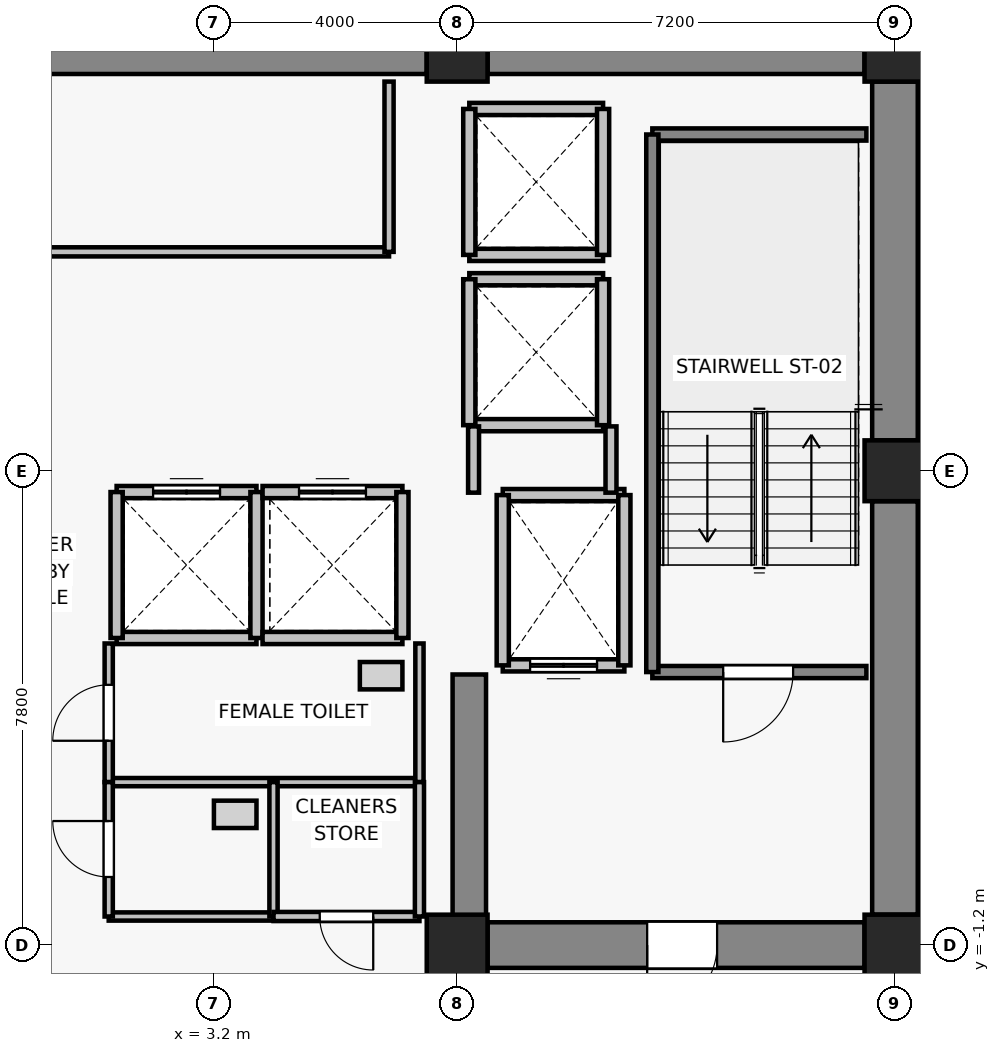
"""IFC4 building model, lengths in metres.
Left out: names, types, materials, properties, quantities, classifications, styles, units other than length and angle.
Written with IfcOpenShell. Run it as: python <this file> out.ifc"""

import sys

from ifc_helpers import new_model, si_unit, direction, frame, frame_2d, origin, origin_2d, place, context, subcontext, project, spatial, rectangle, extrude, source, transform, mapped, element, fill, save


model = new_model("IFC4")
c1 = context("Model", 3, precision=1e-05, world=origin(), true_north=direction((0.0, 1.0)))
c2 = subcontext(c1, "Body", "Model", "MODEL_VIEW")
j1 = project(units=[si_unit("LENGTHUNIT", "METRE"), si_unit("PLANEANGLEUNIT", "RADIAN")], contexts=[c1])
p1 = place(None, origin())
s1 = spatial("IfcSite", under=j1, at=p1, CompositionType="ELEMENT")
p2 = place(p1, origin())
s2 = spatial("IfcBuilding", under=s1, at=p2, CompositionType="ELEMENT")
p3 = place(p2, frame((0.0, 0.0, 182.5)))
s3 = spatial("IfcBuildingStorey", under=s2, at=p3, CompositionType="ELEMENT", Elevation=182.5)
for number, where, z_axis, x_axis in (
    (1, (7.2, -1.2, 0.0), (0.0, 0.0, 1.0), (1.0, 0.0, 0.0)),
    (2, (14.4, -1.2, 0.0), (0.0, 0.0, 1.0), (1.0, 0.0, 0.0)),
    (3, (14.4, 6.6, 0.0), (0.0, 0.0, 1.0), (1.0, 0.0, 0.0)),
    (4, (7.2, 13.5, 0.0), (0.0, 0.0, 1.0), (1.0, 0.0, 0.0)),
    (5, (14.4, 13.5, 0.0), (0.0, 0.0, 1.0), (1.0, 0.0, 0.0)),
):
    element("IfcColumn", number, at=place(p3, frame(where, z_axis=z_axis, x_axis=x_axis)), inside=s3, PredefinedType="COLUMN", context=c2, shape_type="SweptSolid", body=[
        extrude(rectangle(XDim=1.0, YDim=1.0, at=origin_2d()), origin(), (0.0, 0.0, 1.0), 3.3),
    ])
p4 = place(p3, frame((-6.7, 13.5, 0.0), z_axis=(0.0, 0.0, 1.0), x_axis=(1.0, 0.0, 0.0)))
e6 = element("IfcWall", 6, at=p4, inside=s3, PredefinedType="SHEAR", context=c2, shape_type="SweptSolid", body=[
    extrude(rectangle(XDim=13.4, YDim=0.75, at=frame_2d((6.7, 0.0))), origin(), (0.0, 0.0, 1.0), 3.075),
])
p5 = place(p3, frame((7.7, 13.5, 0.0), z_axis=(0.0, 0.0, 1.0), x_axis=(1.0, 0.0, 0.0)))
e7 = element("IfcWall", 7, at=p5, inside=s3, PredefinedType="SHEAR", context=c2, shape_type="SweptSolid", body=[
    extrude(rectangle(XDim=6.2, YDim=0.75, at=frame_2d((3.1, 0.0))), origin(), (0.0, 0.0, 1.0), 3.075),
])
p6 = place(p3, frame((14.4, -0.7, 0.0), z_axis=(0.0, 0.0, 1.0), x_axis=(0.0, 1.0, 0.0)))
e8 = element("IfcWall", 8, at=p6, inside=s3, PredefinedType="SHEAR", context=c2, shape_type="SweptSolid", body=[
    extrude(rectangle(XDim=6.8, YDim=0.75, at=frame_2d((3.4, 0.0))), origin(), (0.0, 0.0, 1.0), 3.075),
])
p7 = place(p3, frame((14.4, 7.1, 0.0), z_axis=(0.0, 0.0, 1.0), x_axis=(0.0, 1.0, 0.0)))
e9 = element("IfcWall", 9, at=p7, inside=s3, PredefinedType="SHEAR", context=c2, shape_type="SweptSolid", body=[
    extrude(rectangle(XDim=5.9, YDim=0.75, at=frame_2d((2.95, 0.0))), origin(), (0.0, 0.0, 1.0), 3.075),
])
p8 = place(p3, frame((13.9, -1.2, 0.0), z_axis=(0.0, 0.0, 1.0), x_axis=(-1.0, 0.0, 0.0)))
e10 = element("IfcWall", 10, at=p8, inside=s3, PredefinedType="SHEAR", context=c2, shape_type="SweptSolid", body=[
    extrude(rectangle(XDim=6.2, YDim=0.75, at=frame_2d((3.1, 0.0))), origin(), (0.0, 0.0, 1.0), 3.075),
])
p9 = place(p8, frame((2.425, 0.0, 0.0)))
e11 = element("IfcOpeningElement", 11, at=p9, cuts=e10, PredefinedType="OPENING", context=c2, shape_type="SweptSolid", body=[
    extrude(rectangle(XDim=1.15, YDim=2.15, at=frame_2d((0.575, 1.075))), frame((0.0, 0.385, 0.0), z_axis=(0.0, -1.0, 0.0), x_axis=(1.0, 0.0, 0.0)), (0.0, 0.0, 1.0), 0.77),
])
p10 = place(p3, frame((7.4, -0.825, 0.0), z_axis=(0.0, 0.0, 1.0), x_axis=(0.0, 1.0, 0.0)))
e12 = element("IfcWall", 12, at=p10, inside=s3, PredefinedType="SHEAR", context=c2, shape_type="SweptSolid", body=[
    extrude(rectangle(XDim=4.075, YDim=0.55, at=frame_2d((2.038, 0.0))), origin(), (0.0, 0.0, 1.0), 3.075),
])
p11 = place(p3, frame((9.95, 3.4, 0.0), z_axis=(0.0, 0.0, 1.0), x_axis=(-1.0, 0.0, 0.0)))
e13 = element("IfcWall", 13, at=p11, inside=s3, PredefinedType="SOLIDWALL", context=c2, shape_type="SweptSolid", body=[
    extrude(rectangle(XDim=2.0, YDim=0.2, at=frame_2d((1.0, 0.0))), origin(), (0.0, 0.0, 1.0), 3.075),
])
p12 = place(p11, frame((0.45, 0.0, 0.0)))
e14 = element("IfcOpeningElement", 14, at=p12, cuts=e13, PredefinedType="OPENING", context=c2, shape_type="SweptSolid", body=[
    extrude(rectangle(XDim=1.1, YDim=2.2, at=frame_2d((0.55, 1.1))), frame((0.0, 0.11, 0.0), z_axis=(0.0, -1.0, 0.0), x_axis=(1.0, 0.0, 0.0)), (0.0, 0.0, 1.0), 0.22),
])
p13 = place(p3, frame((7.95, 6.2, 0.0), z_axis=(0.0, 0.0, 1.0), x_axis=(1.0, 0.0, 0.0)))
e15 = element("IfcWall", 15, at=p13, inside=s3, PredefinedType="SOLIDWALL", context=c2, shape_type="SweptSolid", body=[
    extrude(rectangle(XDim=2.0, YDim=0.2, at=frame_2d((1.0, 0.0))), origin(), (0.0, 0.0, 1.0), 3.075),
])
for number, where, z_axis, x_axis in (
    (16, (7.95, 3.4, 0.0), (0.0, 0.0, 1.0), (0.0, 1.0, 0.0)),
    (17, (9.95, 6.2, 0.0), (0.0, 0.0, 1.0), (0.0, -1.0, 0.0)),
):
    element("IfcWall", number, at=place(p3, frame(where, z_axis=z_axis, x_axis=x_axis)), inside=s3, PredefinedType="SOLIDWALL", context=c2, shape_type="SweptSolid", body=[
        extrude(rectangle(XDim=2.8, YDim=0.2, at=frame_2d((1.4, 0.0))), origin(), (0.0, 0.0, 1.0), 3.075),
    ])
p14 = place(p3, frame((3.9, 3.85, 0.0), z_axis=(0.0, 0.0, 1.0), x_axis=(-1.0, 0.0, 0.0)))
e18 = element("IfcWall", 18, at=p14, inside=s3, PredefinedType="SOLIDWALL", context=c2, shape_type="SweptSolid", body=[
    extrude(rectangle(XDim=2.3, YDim=0.2, at=frame_2d((1.15, 0.0))), origin(), (0.0, 0.0, 1.0), 3.075),
])
p15 = place(p3, frame((1.6, 6.25, 0.0), z_axis=(0.0, 0.0, 1.0), x_axis=(1.0, 0.0, 0.0)))
e19 = element("IfcWall", 19, at=p15, inside=s3, PredefinedType="SOLIDWALL", context=c2, shape_type="SweptSolid", body=[
    extrude(rectangle(XDim=2.3, YDim=0.2, at=frame_2d((1.15, 0.0))), origin(), (0.0, 0.0, 1.0), 3.075),
])
p16 = place(p15, frame((0.6, 0.0, 0.0)))
e20 = element("IfcOpeningElement", 20, at=p16, cuts=e19, PredefinedType="OPENING", context=c2, shape_type="SweptSolid", body=[
    extrude(rectangle(XDim=1.1, YDim=2.2, at=frame_2d((0.55, 1.1))), frame((0.0, 0.11, 0.0), z_axis=(0.0, -1.0, 0.0), x_axis=(1.0, 0.0, 0.0)), (0.0, 0.0, 1.0), 0.22),
])
for number, where, z_axis, x_axis in (
    (21, (1.6, 3.85, 0.0), (0.0, 0.0, 1.0), (0.0, 1.0, 0.0)),
    (22, (3.9, 6.25, 0.0), (0.0, 0.0, 1.0), (0.0, -1.0, 0.0)),
):
    element("IfcWall", number, at=place(p3, frame(where, z_axis=z_axis, x_axis=x_axis)), inside=s3, PredefinedType="SOLIDWALL", context=c2, shape_type="SweptSolid", body=[
        extrude(rectangle(XDim=2.4, YDim=0.2, at=frame_2d((1.2, 0.0))), origin(), (0.0, 0.0, 1.0), 3.075),
    ])
p17 = place(p3, frame((6.3, 3.85, 0.0), z_axis=(0.0, 0.0, 1.0), x_axis=(-1.0, 0.0, 0.0)))
e23 = element("IfcWall", 23, at=p17, inside=s3, PredefinedType="SOLIDWALL", context=c2, shape_type="SweptSolid", body=[
    extrude(rectangle(XDim=2.3, YDim=0.2, at=frame_2d((1.15, 0.0))), origin(), (0.0, 0.0, 1.0), 3.075),
])
p18 = place(p3, frame((4.0, 6.25, 0.0), z_axis=(0.0, 0.0, 1.0), x_axis=(1.0, 0.0, 0.0)))
e24 = element("IfcWall", 24, at=p18, inside=s3, PredefinedType="SOLIDWALL", context=c2, shape_type="SweptSolid", body=[
    extrude(rectangle(XDim=2.3, YDim=0.2, at=frame_2d((1.15, 0.0))), origin(), (0.0, 0.0, 1.0), 3.075),
])
p19 = place(p18, frame((0.6, 0.0, 0.0)))
e25 = element("IfcOpeningElement", 25, at=p19, cuts=e24, PredefinedType="OPENING", context=c2, shape_type="SweptSolid", body=[
    extrude(rectangle(XDim=1.1, YDim=2.2, at=frame_2d((0.55, 1.1))), frame((0.0, 0.11, 0.0), z_axis=(0.0, -1.0, 0.0), x_axis=(1.0, 0.0, 0.0)), (0.0, 0.0, 1.0), 0.22),
])
p20 = place(p3, frame((6.3, 6.25, 0.0), z_axis=(0.0, 0.0, 1.0), x_axis=(0.0, -1.0, 0.0)))
e26 = element("IfcWall", 26, at=p20, inside=s3, PredefinedType="SOLIDWALL", context=c2, shape_type="SweptSolid", body=[
    extrude(rectangle(XDim=2.4, YDim=0.2, at=frame_2d((1.2, 0.0))), origin(), (0.0, 0.0, 1.0), 3.075),
])
for number, where, z_axis, x_axis in (
    (27, (9.6, 7.35, 0.0), (0.0, 0.0, 1.0), (-1.0, 0.0, 0.0)),
    (28, (7.4, 9.75, 0.0), (0.0, 0.0, 1.0), (1.0, 0.0, 0.0)),
):
    element("IfcWall", number, at=place(p3, frame(where, z_axis=z_axis, x_axis=x_axis)), inside=s3, PredefinedType="SOLIDWALL", context=c2, shape_type="SweptSolid", body=[
        extrude(rectangle(XDim=2.2, YDim=0.2, at=frame_2d((1.1, 0.0))), origin(), (0.0, 0.0, 1.0), 2.565),
    ])
p21 = place(p3, frame((7.4, 7.35, 0.0), z_axis=(0.0, 0.0, 1.0), x_axis=(0.0, 1.0, 0.0)))
e29 = element("IfcWall", 29, at=p21, inside=s3, PredefinedType="SOLIDWALL", context=c2, shape_type="SweptSolid", body=[
    extrude(rectangle(XDim=2.4, YDim=0.2, at=frame_2d((1.2, 0.0))), origin(), (0.0, 0.0, 1.0), 2.565),
])
p22 = place(p3, frame((9.6, 9.75, 0.0), z_axis=(0.0, 0.0, 1.0), x_axis=(0.0, -1.0, 0.0)))
e30 = element("IfcWall", 30, at=p22, inside=s3, PredefinedType="SOLIDWALL", context=c2, shape_type="SweptSolid", body=[
    extrude(rectangle(XDim=2.4, YDim=0.2, at=frame_2d((1.2, 0.0))), origin(), (0.0, 0.0, 1.0), 3.075),
])
for number, where, z_axis, x_axis in (
    (31, (9.6, 10.15, 0.0), (0.0, 0.0, 1.0), (-1.0, 0.0, 0.0)),
    (32, (7.4, 12.55, 0.0), (0.0, 0.0, 1.0), (1.0, 0.0, 0.0)),
):
    element("IfcWall", number, at=place(p3, frame(where, z_axis=z_axis, x_axis=x_axis)), inside=s3, PredefinedType="SOLIDWALL", context=c2, shape_type="SweptSolid", body=[
        extrude(rectangle(XDim=2.2, YDim=0.2, at=frame_2d((1.1, 0.0))), origin(), (0.0, 0.0, 1.0), 2.565),
    ])
p23 = place(p3, frame((7.4, 10.15, 0.0), z_axis=(0.0, 0.0, 1.0), x_axis=(0.0, 1.0, 0.0)))
e33 = element("IfcWall", 33, at=p23, inside=s3, PredefinedType="SOLIDWALL", context=c2, shape_type="SweptSolid", body=[
    extrude(rectangle(XDim=2.4, YDim=0.2, at=frame_2d((1.2, 0.0))), origin(), (0.0, 0.0, 1.0), 2.565),
])
p24 = place(p3, frame((9.6, 12.55, 0.0), z_axis=(0.0, 0.0, 1.0), x_axis=(0.0, -1.0, 0.0)))
e34 = element("IfcWall", 34, at=p24, inside=s3, PredefinedType="SOLIDWALL", context=c2, shape_type="SweptSolid", body=[
    extrude(rectangle(XDim=2.4, YDim=0.2, at=frame_2d((1.2, 0.0))), origin(), (0.0, 0.0, 1.0), 3.075),
])
p25 = place(p3, frame((13.93, 3.29, 0.0), z_axis=(0.0, 0.0, 1.0), x_axis=(-1.0, 0.0, 0.0)))
e35 = element("IfcWall", 35, at=p25, inside=s3, PredefinedType="SOLIDWALL", context=c2, shape_type="SweptSolid", body=[
    extrude(rectangle(XDim=3.52, YDim=0.2, at=frame_2d((1.76, 0.0))), origin(), (0.0, 0.0, 1.0), 3.075),
])
p26 = place(p25, frame((1.205, 0.0, 0.0)))
e36 = element("IfcOpeningElement", 36, at=p26, cuts=e35, PredefinedType="OPENING", context=c2, shape_type="SweptSolid", body=[
    extrude(rectangle(XDim=1.15, YDim=2.15, at=frame_2d((0.575, 1.075))), frame((0.0, 0.11, 0.0), z_axis=(0.0, -1.0, 0.0), x_axis=(1.0, 0.0, 0.0)), (0.0, 0.0, 1.0), 0.22),
])
p27 = place(p3, frame((10.41, 12.13, 0.0), z_axis=(0.0, 0.0, 1.0), x_axis=(1.0, 0.0, 0.0)))
e37 = element("IfcWall", 37, at=p27, inside=s3, PredefinedType="SOLIDWALL", context=c2, shape_type="SweptSolid", body=[
    extrude(rectangle(XDim=3.52, YDim=0.2, at=frame_2d((1.76, 0.0))), origin(), (0.0, 0.0, 1.0), 3.075),
])
p28 = place(p3, frame((10.41, 3.29, 0.0), z_axis=(0.0, 0.0, 1.0), x_axis=(0.0, 1.0, 0.0)))
e38 = element("IfcWall", 38, at=p28, inside=s3, PredefinedType="SOLIDWALL", context=c2, shape_type="SweptSolid", body=[
    extrude(rectangle(XDim=8.84, YDim=0.2, at=frame_2d((4.42, 0.0))), origin(), (0.0, 0.0, 1.0), 3.075),
])
p29 = place(p3, frame((7.47, 6.24, 0.0), z_axis=(0.0, 0.0, 1.0), x_axis=(0.0, 1.0, 0.0)))
e39 = element("IfcWall", 39, at=p29, inside=s3, PredefinedType="PARTITIONING", context=c2, shape_type="SweptSolid", body=[
    extrude(rectangle(XDim=1.09, YDim=0.18, at=frame_2d((0.545, 0.0))), origin(), (0.0, 0.0, 1.0), 2.565),
])
p30 = place(p3, frame((9.73, 7.33, 0.0), z_axis=(0.0, 0.0, 1.0), x_axis=(0.0, -1.0, 0.0)))
e40 = element("IfcWall", 40, at=p30, inside=s3, PredefinedType="PARTITIONING", context=c2, shape_type="SweptSolid", body=[
    extrude(rectangle(XDim=1.09, YDim=0.18, at=frame_2d((0.545, 0.0))), origin(), (0.0, 0.0, 1.0), 3.075),
])
p31 = place(p3, frame((6.08, 10.2, 0.0), z_axis=(0.0, 0.0, 1.0), x_axis=(-1.0, 0.0, 0.0)))
e41 = element("IfcWall", 41, at=p31, inside=s3, PredefinedType="PARTITIONING", context=c2, shape_type="SweptSolid", body=[
    extrude(rectangle(XDim=12.16, YDim=0.15, at=frame_2d((6.08, 0.0))), origin(), (0.0, 0.0, 1.0), 3.075),
])
p32 = place(p31, frame((7.005, 0.0, 0.0)))
e42 = element("IfcOpeningElement", 42, at=p32, cuts=e41, PredefinedType="OPENING", context=c2, shape_type="SweptSolid", body=[
    extrude(rectangle(XDim=1.15, YDim=2.15, at=frame_2d((0.575, 1.075))), frame((0.0, 0.085, 0.0), z_axis=(0.0, -1.0, 0.0), x_axis=(1.0, 0.0, 0.0)), (0.0, 0.0, 1.0), 0.17),
])
p33 = place(p3, frame((6.08, 13.0, 0.0), z_axis=(0.0, 0.0, 1.0), x_axis=(0.0, -1.0, 0.0)))
e43 = element("IfcWall", 43, at=p33, inside=s3, PredefinedType="PARTITIONING", context=c2, shape_type="SweptSolid", body=[
    extrude(rectangle(XDim=2.8, YDim=0.15, at=frame_2d((1.4, 0.0))), origin(), (0.0, 0.0, 1.0), 3.075),
])
p34 = place(p3, frame((6.58, 1.48, 0.0), z_axis=(0.0, 0.0, 1.0), x_axis=(-1.0, 0.0, 0.0)))
e44 = element("IfcWall", 44, at=p34, inside=s3, PredefinedType="PARTITIONING", context=c2, shape_type="SweptSolid", body=[
    extrude(rectangle(XDim=5.11, YDim=0.135, at=frame_2d((2.555, 0.0))), origin(), (0.0, 0.0, 1.0), 3.075),
])
p35 = place(p3, frame((1.47, 1.48, 0.0), z_axis=(0.0, 0.0, 1.0), x_axis=(0.0, 1.0, 0.0)))
e45 = element("IfcWall", 45, at=p35, inside=s3, PredefinedType="PARTITIONING", context=c2, shape_type="SweptSolid", body=[
    extrude(rectangle(XDim=2.28, YDim=0.135, at=frame_2d((1.14, 0.0))), origin(), (0.0, 0.0, 1.0), 3.075),
])
p36 = place(p35, frame((0.68, 0.0, 0.0)))
e46 = element("IfcOpeningElement", 46, at=p36, cuts=e45, PredefinedType="OPENING", context=c2, shape_type="SweptSolid", body=[
    extrude(rectangle(XDim=0.92, YDim=2.1, at=frame_2d((0.46, 1.05))), frame((0.0, 0.077, 0.0), z_axis=(0.0, -1.0, 0.0), x_axis=(1.0, 0.0, 0.0)), (0.0, 0.0, 1.0), 0.155),
])
p37 = place(p3, frame((6.58, 3.76, 0.0), z_axis=(0.0, 0.0, 1.0), x_axis=(0.0, -1.0, 0.0)))
e47 = element("IfcWall", 47, at=p37, inside=s3, PredefinedType="PARTITIONING", context=c2, shape_type="SweptSolid", body=[
    extrude(rectangle(XDim=2.28, YDim=0.135, at=frame_2d((1.14, 0.0))), origin(), (0.0, 0.0, 1.0), 3.075),
])
p38 = place(p3, frame((4.18, -0.73, 0.0), z_axis=(0.0, 0.0, 1.0), x_axis=(-1.0, 0.0, 0.0)))
e48 = element("IfcWall", 48, at=p38, inside=s3, PredefinedType="PARTITIONING", context=c2, shape_type="SweptSolid", body=[
    extrude(rectangle(XDim=2.71, YDim=0.135, at=frame_2d((1.355, 0.0))), origin(), (0.0, 0.0, 1.0), 3.075),
])
p39 = place(p3, frame((1.47, -0.73, 0.0), z_axis=(0.0, 0.0, 1.0), x_axis=(0.0, 1.0, 0.0)))
e49 = element("IfcWall", 49, at=p39, inside=s3, PredefinedType="PARTITIONING", context=c2, shape_type="SweptSolid", body=[
    extrude(rectangle(XDim=2.21, YDim=0.135, at=frame_2d((1.105, 0.0))), origin(), (0.0, 0.0, 1.0), 3.075),
])
p40 = place(p39, frame((0.65, 0.0, 0.0)))
e50 = element("IfcOpeningElement", 50, at=p40, cuts=e49, PredefinedType="OPENING", context=c2, shape_type="SweptSolid", body=[
    extrude(rectangle(XDim=0.92, YDim=2.1, at=frame_2d((0.46, 1.05))), frame((0.0, 0.077, 0.0), z_axis=(0.0, -1.0, 0.0), x_axis=(1.0, 0.0, 0.0)), (0.0, 0.0, 1.0), 0.155),
])
p41 = place(p3, frame((4.18, 1.48, 0.0), z_axis=(0.0, 0.0, 1.0), x_axis=(0.0, -1.0, 0.0)))
e51 = element("IfcWall", 51, at=p41, inside=s3, PredefinedType="PARTITIONING", context=c2, shape_type="SweptSolid", body=[
    extrude(rectangle(XDim=2.21, YDim=0.135, at=frame_2d((1.105, 0.0))), origin(), (0.0, 0.0, 1.0), 3.075),
])
p42 = place(p3, frame((6.58, -0.73, 0.0), z_axis=(0.0, 0.0, 1.0), x_axis=(-1.0, 0.0, 0.0)))
e52 = element("IfcWall", 52, at=p42, inside=s3, PredefinedType="PARTITIONING", context=c2, shape_type="SweptSolid", body=[
    extrude(rectangle(XDim=2.4, YDim=0.15, at=frame_2d((1.2, 0.0))), origin(), (0.0, 0.0, 1.0), 3.075),
])
p43 = place(p42, frame((0.76, 0.0, 0.0)))
e53 = element("IfcOpeningElement", 53, at=p43, cuts=e52, PredefinedType="OPENING", context=c2, shape_type="SweptSolid", body=[
    extrude(rectangle(XDim=0.88, YDim=2.1, at=frame_2d((0.44, 1.05))), frame((0.0, 0.085, 0.0), z_axis=(0.0, -1.0, 0.0), x_axis=(1.0, 0.0, 0.0)), (0.0, 0.0, 1.0), 0.17),
])
p44 = place(p3, frame((6.58, 1.48, 0.0), z_axis=(0.0, 0.0, 1.0), x_axis=(0.0, -1.0, 0.0)))
e54 = element("IfcWall", 54, at=p44, inside=s3, PredefinedType="PARTITIONING", context=c2, shape_type="SweptSolid", body=[
    extrude(rectangle(XDim=2.21, YDim=0.15, at=frame_2d((1.105, 0.0))), origin(), (0.0, 0.0, 1.0), 3.075),
])
m1 = source(origin(), c2, "Body", "SweptSolid", [
    extrude(rectangle(XDim=1.1, YDim=2.2, at=frame_2d((0.55, 1.1))), frame((0.0, 0.025, 0.0), z_axis=(0.0, -1.0, 0.0), x_axis=(1.0, 0.0, 0.0)), (0.0, 0.0, 1.0), 0.05),
])
p45 = place(p12, origin())
e55 = element("IfcDoor", 55, at=p45, inside=s3, OperationType="DOUBLE_DOOR_SLIDING", PredefinedType="DOOR", context=c2, shape_type="MappedRepresentation", body=[
    mapped(m1, transform((0.0, 0.0, 0.0), x_axis=(1.0, 0.0, 0.0), y_axis=(0.0, 1.0, 0.0), z_axis=(0.0, 0.0, 1.0), scale=1.0)),
])
fill(e14, e55)
p46 = place(p16, origin())
e56 = element("IfcDoor", 56, at=p46, inside=s3, OperationType="DOUBLE_DOOR_SLIDING", PredefinedType="DOOR", context=c2, shape_type="MappedRepresentation", body=[
    mapped(m1, transform((0.0, 0.0, 0.0), x_axis=(1.0, 0.0, 0.0), y_axis=(0.0, 1.0, 0.0), z_axis=(0.0, 0.0, 1.0), scale=1.0)),
])
fill(e20, e56)
p47 = place(p19, origin())
e57 = element("IfcDoor", 57, at=p47, inside=s3, OperationType="DOUBLE_DOOR_SLIDING", PredefinedType="DOOR", context=c2, shape_type="MappedRepresentation", body=[
    mapped(m1, transform((0.0, 0.0, 0.0), x_axis=(1.0, 0.0, 0.0), y_axis=(0.0, 1.0, 0.0), z_axis=(0.0, 0.0, 1.0), scale=1.0)),
])
fill(e25, e57)
m2 = source(origin(), c2, "Body", "SweptSolid", [
    extrude(rectangle(XDim=1.15, YDim=2.15, at=frame_2d((0.575, 1.075))), frame((0.0, 0.025, 0.0), z_axis=(0.0, -1.0, 0.0), x_axis=(1.0, 0.0, 0.0)), (0.0, 0.0, 1.0), 0.05),
])
p48 = place(p26, origin())
e58 = element("IfcDoor", 58, at=p48, inside=s3, OperationType="SINGLE_SWING_RIGHT", PredefinedType="DOOR", context=c2, shape_type="MappedRepresentation", body=[
    mapped(m2, transform((0.0, 0.0, 0.0), x_axis=(1.0, 0.0, 0.0), y_axis=(0.0, 1.0, 0.0), z_axis=(0.0, 0.0, 1.0), scale=1.0)),
])
fill(e36, e58)
p49 = place(p9, origin())
e59 = element("IfcDoor", 59, at=p49, inside=s3, OperationType="SINGLE_SWING_RIGHT", PredefinedType="DOOR", context=c2, shape_type="MappedRepresentation", body=[
    mapped(m2, transform((0.0, 0.0, 0.0), x_axis=(1.0, 0.0, 0.0), y_axis=(0.0, 1.0, 0.0), z_axis=(0.0, 0.0, 1.0), scale=1.0)),
])
fill(e11, e59)
m3 = source(origin(), c2, "Body", "SweptSolid", [
    extrude(rectangle(XDim=0.92, YDim=2.1, at=frame_2d((0.46, 1.05))), frame((0.0, 0.025, 0.0), z_axis=(0.0, -1.0, 0.0), x_axis=(1.0, 0.0, 0.0)), (0.0, 0.0, 1.0), 0.05),
])
p50 = place(p36, origin())
e60 = element("IfcDoor", 60, at=p50, inside=s3, OperationType="SINGLE_SWING_LEFT", PredefinedType="DOOR", context=c2, shape_type="MappedRepresentation", body=[
    mapped(m3, transform((0.0, 0.0, 0.0), x_axis=(1.0, 0.0, 0.0), y_axis=(0.0, 1.0, 0.0), z_axis=(0.0, 0.0, 1.0), scale=1.0)),
])
fill(e46, e60)
p51 = place(p40, origin())
e61 = element("IfcDoor", 61, at=p51, inside=s3, OperationType="SINGLE_SWING_RIGHT", PredefinedType="DOOR", context=c2, shape_type="MappedRepresentation", body=[
    mapped(m3, transform((0.0, 0.0, 0.0), x_axis=(1.0, 0.0, 0.0), y_axis=(0.0, 1.0, 0.0), z_axis=(0.0, 0.0, 1.0), scale=1.0)),
])
fill(e50, e61)
m4 = source(origin(), c2, "Body", "SweptSolid", [
    extrude(rectangle(XDim=0.88, YDim=2.1, at=frame_2d((0.44, 1.05))), frame((0.0, 0.025, 0.0), z_axis=(0.0, -1.0, 0.0), x_axis=(1.0, 0.0, 0.0)), (0.0, 0.0, 1.0), 0.05),
])
p52 = place(p43, origin())
e62 = element("IfcDoor", 62, at=p52, inside=s3, OperationType="SINGLE_SWING_LEFT", PredefinedType="DOOR", context=c2, shape_type="MappedRepresentation", body=[
    mapped(m4, transform((0.0, 0.0, 0.0), x_axis=(1.0, 0.0, 0.0), y_axis=(0.0, 1.0, 0.0), z_axis=(0.0, 0.0, 1.0), scale=1.0)),
])
fill(e53, e62)
save(model, sys.argv[1])
